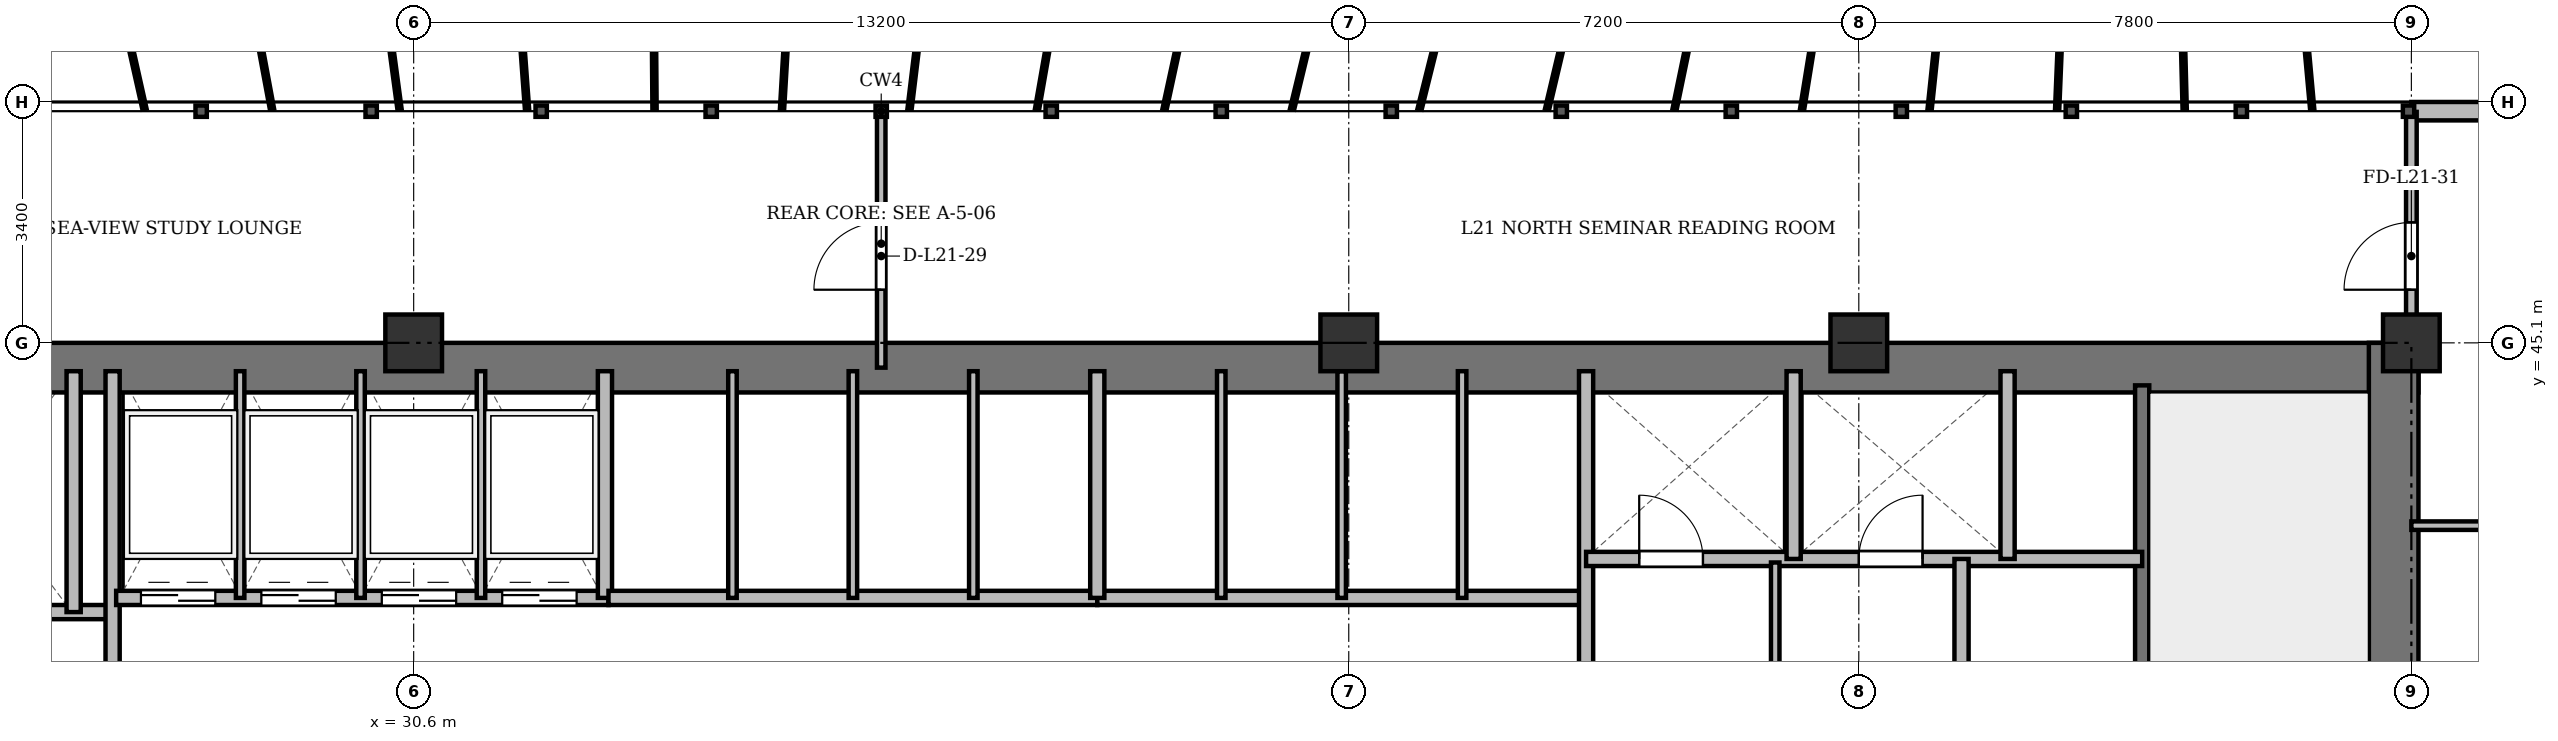
"""IFC4 building model, lengths in metres.
Left out: names, types, materials, properties, quantities, classifications, styles, units other than length and angle.
Written with IfcOpenShell. Run it as: python <this file> out.ifc"""

import sys

from ifc_helpers import new_model, si_unit, direction, frame, frame_2d, origin, origin_2d, place, context, subcontext, project, spatial, rectangle, extrude, source, transform, mapped, element, fill, save


model = new_model("IFC4")
c1 = context("Model", 3, precision=1e-05, world=origin(), true_north=direction((0.0, 1.0)))
c2 = subcontext(c1, "Body", "Model", "MODEL_VIEW")
j1 = project(units=[si_unit("LENGTHUNIT", "METRE"), si_unit("PLANEANGLEUNIT", "RADIAN")], contexts=[c1])
p1 = place(None, origin())
s1 = spatial("IfcSite", under=j1, at=p1, CompositionType="ELEMENT")
p2 = place(p1, origin())
s2 = spatial("IfcBuilding", under=s1, at=p2, CompositionType="ELEMENT")
p3 = place(p2, frame((0.0, 0.0, 85.3)))
s3 = spatial("IfcBuildingStorey", under=s2, at=p3, CompositionType="ELEMENT", Elevation=85.3)
m1 = source(origin(), c2, "Body", "SweptSolid", [
    extrude(rectangle(XDim=0.8, YDim=0.8, at=origin_2d()), origin(), (0.0, 0.0, 1.0), 3.6),
])
for number, where, z_axis, x_axis in (
    (1, (30.6, 45.1, 0.0), (0.0, 0.0, 1.0), (1.0, 0.0, 0.0)),
    (2, (43.8, 45.1, 0.0), (0.0, 0.0, 1.0), (1.0, 0.0, 0.0)),
    (3, (51.0, 45.1, 0.0), (0.0, 0.0, 1.0), (1.0, 0.0, 0.0)),
    (4, (58.8, 45.1, 0.0), (0.0, 0.0, 1.0), (1.0, 0.0, 0.0)),
):
    element("IfcColumn", number, at=place(p3, frame(where, z_axis=z_axis, x_axis=x_axis)), inside=s3, PredefinedType="COLUMN", context=c2, shape_type="MappedRepresentation", body=[
        mapped(m1, transform((0.0, 0.0, 0.0), x_axis=(1.0, 0.0, 0.0), y_axis=(0.0, 1.0, 0.0), z_axis=(0.0, 0.0, 1.0), scale=1.0)),
    ])
p4 = place(p3, frame((58.8, 48.37, 0.0), z_axis=(0.0, 0.0, 1.0), x_axis=(1.0, 0.0, 0.0)))
e5 = element("IfcWall", 5, at=p4, inside=s3, PredefinedType="SOLIDWALL", context=c2, shape_type="SweptSolid", body=[
    extrude(rectangle(XDim=8.0, YDim=0.26, at=frame_2d((4.0, 0.0))), origin(), (0.0, 0.0, 1.0), 3.34),
])
p5 = place(p4, frame((2.209, 0.0, 0.9)))
e6 = element("IfcOpeningElement", 6, at=p5, cuts=e5, PredefinedType="OPENING", context=c2, shape_type="SweptSolid", body=[
    extrude(rectangle(XDim=1.35, YDim=1.5, at=frame_2d((0.675, 0.75))), frame((0.0, 0.14, 0.0), z_axis=(0.0, -1.0, 0.0), x_axis=(1.0, 0.0, 0.0)), (0.0, 0.0, 1.0), 0.28),
])
p6 = place(p4, frame((6.033, 0.0, 0.9)))
e7 = element("IfcOpeningElement", 7, at=p6, cuts=e5, PredefinedType="OPENING", context=c2, shape_type="SweptSolid", body=[
    extrude(rectangle(XDim=1.2, YDim=1.65, at=frame_2d((0.6, 0.825))), frame((0.0, 0.14, 0.0), z_axis=(0.0, -1.0, 0.0), x_axis=(1.0, 0.0, 0.0)), (0.0, 0.0, 1.0), 0.28),
])
p7 = place(p3, frame((15.5, 44.75, 0.0), z_axis=(0.0, 0.0, 1.0), x_axis=(1.0, 0.0, 0.0)))
e8 = element("IfcWall", 8, at=p7, inside=s3, PredefinedType="SHEAR", context=c2, shape_type="SweptSolid", body=[
    extrude(rectangle(XDim=43.4, YDim=0.7, at=frame_2d((21.7, 0.0))), origin(), (0.0, 0.0, 1.0), 3.34),
])
p8 = place(p3, frame((58.55, 33.4, 0.0), z_axis=(0.0, 0.0, 1.0), x_axis=(0.0, 1.0, 0.0)))
e9 = element("IfcWall", 9, at=p8, inside=s3, PredefinedType="SHEAR", context=c2, shape_type="SweptSolid", body=[
    extrude(rectangle(XDim=11.7, YDim=0.7, at=frame_2d((5.85, 0.0))), origin(), (0.0, 0.0, 1.0), 3.34),
])
p9 = place(p3, frame((55.0, 33.4, 0.0), z_axis=(0.0, 0.0, 1.0), x_axis=(0.0, 1.0, 0.0)))
e10 = element("IfcWall", 10, at=p9, inside=s3, PredefinedType="SHEAR", context=c2, shape_type="SweptSolid", body=[
    extrude(rectangle(XDim=11.1, YDim=0.2, at=frame_2d((5.55, 0.0))), origin(), (0.0, 0.0, 1.0), 3.34),
])
p10 = place(p9, frame((0.85, 0.0, 0.0)))
e11 = element("IfcOpeningElement", 11, at=p10, cuts=e10, PredefinedType="OPENING", context=c2, shape_type="SweptSolid", body=[
    extrude(rectangle(XDim=1.1, YDim=2.15, at=frame_2d((0.55, 1.075))), frame((0.0, 0.11, 0.0), z_axis=(0.0, -1.0, 0.0), x_axis=(1.0, 0.0, 0.0)), (0.0, 0.0, 1.0), 0.22),
])
p11 = place(p3, frame((19.55, 41.3, 0.0), z_axis=(0.0, 0.0, 1.0), x_axis=(1.0, 0.0, 0.0)))
e12 = element("IfcWall", 12, at=p11, inside=s3, PredefinedType="SOLIDWALL", context=c2, shape_type="SweptSolid", body=[
    extrude(rectangle(XDim=6.75, YDim=0.2, at=frame_2d((3.375, 0.0))), origin(), (0.0, 0.0, 1.0), 3.34),
])
p12 = place(p11, frame((1.7, 0.0, 0.0)))
e13 = element("IfcOpeningElement", 13, at=p12, cuts=e12, PredefinedType="OPENING", context=c2, shape_type="SweptSolid", body=[
    extrude(rectangle(XDim=1.1, YDim=2.15, at=frame_2d((0.55, 1.075))), frame((0.0, 0.11, 0.0), z_axis=(0.0, -1.0, 0.0), x_axis=(1.0, 0.0, 0.0)), (0.0, 0.0, 1.0), 0.22),
])
p13 = place(p11, frame((4.4, 0.0, 0.0)))
e14 = element("IfcOpeningElement", 14, at=p13, cuts=e12, PredefinedType="OPENING", context=c2, shape_type="SweptSolid", body=[
    extrude(rectangle(XDim=1.1, YDim=2.15, at=frame_2d((0.55, 1.075))), frame((0.0, 0.11, 0.0), z_axis=(0.0, -1.0, 0.0), x_axis=(1.0, 0.0, 0.0)), (0.0, 0.0, 1.0), 0.22),
])
p14 = place(p3, frame((25.8, 41.3, 0.0), z_axis=(0.0, 0.0, 1.0), x_axis=(0.0, 1.0, 0.0)))
e15 = element("IfcWall", 15, at=p14, inside=s3, PredefinedType="SOLIDWALL", context=c2, shape_type="SweptSolid", body=[
    extrude(rectangle(XDim=3.4, YDim=0.2, at=frame_2d((1.7, 0.0))), origin(), (0.0, 0.0, 1.0), 3.34),
])
p15 = place(p3, frame((26.35, 33.4, 0.0), z_axis=(0.0, 0.0, 1.0), x_axis=(0.0, 1.0, 0.0)))
e16 = element("IfcWall", 16, at=p15, inside=s3, PredefinedType="SOLIDWALL", context=c2, shape_type="SweptSolid", body=[
    extrude(rectangle(XDim=11.3, YDim=0.2, at=frame_2d((5.65, 0.0))), origin(), (0.0, 0.0, 1.0), 2.752),
])
p16 = place(p3, frame((26.4, 41.5, 0.0), z_axis=(0.0, 0.0, 1.0), x_axis=(1.0, 0.0, 0.0)))
e17 = element("IfcWall", 17, at=p16, inside=s3, PredefinedType="SOLIDWALL", context=c2, shape_type="SweptSolid", body=[
    extrude(rectangle(XDim=6.95, YDim=0.2, at=frame_2d((3.475, 0.0))), origin(), (0.0, 0.0, 1.0), 3.34),
])
p17 = place(p16, frame((0.35, 0.0, 0.0)))
e18 = element("IfcOpeningElement", 18, at=p17, cuts=e17, PredefinedType="OPENING", context=c2, shape_type="SweptSolid", body=[
    extrude(rectangle(XDim=1.05, YDim=2.15, at=frame_2d((0.525, 1.075))), frame((0.0, 0.11, 0.0), z_axis=(0.0, -1.0, 0.0), x_axis=(1.0, 0.0, 0.0)), (0.0, 0.0, 1.0), 0.22),
])
p18 = place(p16, frame((2.05, 0.0, 0.0)))
e19 = element("IfcOpeningElement", 19, at=p18, cuts=e17, PredefinedType="OPENING", context=c2, shape_type="SweptSolid", body=[
    extrude(rectangle(XDim=1.05, YDim=2.15, at=frame_2d((0.525, 1.075))), frame((0.0, 0.11, 0.0), z_axis=(0.0, -1.0, 0.0), x_axis=(1.0, 0.0, 0.0)), (0.0, 0.0, 1.0), 0.22),
])
p19 = place(p16, frame((3.75, 0.0, 0.0)))
e20 = element("IfcOpeningElement", 20, at=p19, cuts=e17, PredefinedType="OPENING", context=c2, shape_type="SweptSolid", body=[
    extrude(rectangle(XDim=1.05, YDim=2.15, at=frame_2d((0.525, 1.075))), frame((0.0, 0.11, 0.0), z_axis=(0.0, -1.0, 0.0), x_axis=(1.0, 0.0, 0.0)), (0.0, 0.0, 1.0), 0.22),
])
p20 = place(p16, frame((5.45, 0.0, 0.0)))
e21 = element("IfcOpeningElement", 21, at=p20, cuts=e17, PredefinedType="OPENING", context=c2, shape_type="SweptSolid", body=[
    extrude(rectangle(XDim=1.05, YDim=2.15, at=frame_2d((0.525, 1.075))), frame((0.0, 0.11, 0.0), z_axis=(0.0, -1.0, 0.0), x_axis=(1.0, 0.0, 0.0)), (0.0, 0.0, 1.0), 0.22),
])
p21 = place(p3, frame((33.3, 41.5, 0.0), z_axis=(0.0, 0.0, 1.0), x_axis=(0.0, 1.0, 0.0)))
e22 = element("IfcWall", 22, at=p21, inside=s3, PredefinedType="SOLIDWALL", context=c2, shape_type="SweptSolid", body=[
    extrude(rectangle(XDim=3.2, YDim=0.2, at=frame_2d((1.6, 0.0))), origin(), (0.0, 0.0, 1.0), 3.34),
])
for number, where, z_axis, x_axis in (
    (23, (28.15, 41.5, 0.0), (0.0, 0.0, 1.0), (0.0, 1.0, 0.0)),
    (24, (29.85, 41.5, 0.0), (0.0, 0.0, 1.0), (0.0, 1.0, 0.0)),
    (25, (31.55, 41.5, 0.0), (0.0, 0.0, 1.0), (0.0, 1.0, 0.0)),
):
    element("IfcWall", number, at=place(p3, frame(where, z_axis=z_axis, x_axis=x_axis)), inside=s3, PredefinedType="PARTITIONING", context=c2, shape_type="SweptSolid", body=[
        extrude(rectangle(XDim=3.2, YDim=0.12, at=frame_2d((1.6, 0.0))), origin(), (0.0, 0.0, 1.0), 3.34),
    ])
p22 = place(p3, frame((33.35, 41.5, 0.0), z_axis=(0.0, 0.0, 1.0), x_axis=(1.0, 0.0, 0.0)))
e26 = element("IfcWall", 26, at=p22, inside=s3, PredefinedType="SOLIDWALL", context=c2, shape_type="SweptSolid", body=[
    extrude(rectangle(XDim=6.9, YDim=0.2, at=frame_2d((3.45, 0.0))), origin(), (0.0, 0.0, 1.0), 3.34),
])
for number, where, z_axis, x_axis in (
    (27, (35.1, 41.5, 0.0), (0.0, 0.0, 1.0), (0.0, 1.0, 0.0)),
    (28, (36.8, 41.5, 0.0), (0.0, 0.0, 1.0), (0.0, 1.0, 0.0)),
    (29, (38.5, 41.5, 0.0), (0.0, 0.0, 1.0), (0.0, 1.0, 0.0)),
):
    element("IfcWall", number, at=place(p3, frame(where, z_axis=z_axis, x_axis=x_axis)), inside=s3, PredefinedType="PARTITIONING", context=c2, shape_type="SweptSolid", body=[
        extrude(rectangle(XDim=3.2, YDim=0.12, at=frame_2d((1.6, 0.0))), origin(), (0.0, 0.0, 1.0), 3.34),
    ])
p23 = place(p3, frame((40.25, 41.5, 0.0), z_axis=(0.0, 0.0, 1.0), x_axis=(1.0, 0.0, 0.0)))
e30 = element("IfcWall", 30, at=p23, inside=s3, PredefinedType="SOLIDWALL", context=c2, shape_type="SweptSolid", body=[
    extrude(rectangle(XDim=6.9, YDim=0.2, at=frame_2d((3.45, 0.0))), origin(), (0.0, 0.0, 1.0), 2.84),
])
p24 = place(p3, frame((40.25, 41.5, 0.0), z_axis=(0.0, 0.0, 1.0), x_axis=(0.0, 1.0, 0.0)))
e31 = element("IfcWall", 31, at=p24, inside=s3, PredefinedType="SOLIDWALL", context=c2, shape_type="SweptSolid", body=[
    extrude(rectangle(XDim=3.2, YDim=0.2, at=frame_2d((1.6, 0.0))), origin(), (0.0, 0.0, 1.0), 3.34),
])
p25 = place(p3, frame((42.0, 41.5, 0.0), z_axis=(0.0, 0.0, 1.0), x_axis=(0.0, 1.0, 0.0)))
e32 = element("IfcWall", 32, at=p25, inside=s3, PredefinedType="PARTITIONING", context=c2, shape_type="SweptSolid", body=[
    extrude(rectangle(XDim=3.2, YDim=0.12, at=frame_2d((1.6, 0.0))), origin(), (0.0, 0.0, 1.0), 3.34),
])
p26 = place(p3, frame((43.7, 41.5, 0.0), z_axis=(0.0, 0.0, 1.0), x_axis=(0.0, 1.0, 0.0)))
e33 = element("IfcWall", 33, at=p26, inside=s3, PredefinedType="PARTITIONING", context=c2, shape_type="SweptSolid", body=[
    extrude(rectangle(XDim=3.2, YDim=0.12, at=frame_2d((1.6, 0.0))), origin(), (0.0, 0.0, 1.0), 2.84),
])
p27 = place(p3, frame((45.4, 41.5, 0.0), z_axis=(0.0, 0.0, 1.0), x_axis=(0.0, 1.0, 0.0)))
e34 = element("IfcWall", 34, at=p27, inside=s3, PredefinedType="PARTITIONING", context=c2, shape_type="SweptSolid", body=[
    extrude(rectangle(XDim=3.2, YDim=0.12, at=frame_2d((1.6, 0.0))), origin(), (0.0, 0.0, 1.0), 3.34),
])
p28 = place(p3, frame((47.15, 33.4, 0.0), z_axis=(0.0, 0.0, 1.0), x_axis=(0.0, 1.0, 0.0)))
e35 = element("IfcWall", 35, at=p28, inside=s3, PredefinedType="SOLIDWALL", context=c2, shape_type="SweptSolid", body=[
    extrude(rectangle(XDim=11.3, YDim=0.2, at=frame_2d((5.65, 0.0))), origin(), (0.0, 0.0, 1.0), 2.752),
])
p29 = place(p3, frame((47.15, 42.05, 0.0), z_axis=(0.0, 0.0, 1.0), x_axis=(1.0, 0.0, 0.0)))
e36 = element("IfcWall", 36, at=p29, inside=s3, PredefinedType="SOLIDWALL", context=c2, shape_type="SweptSolid", body=[
    extrude(rectangle(XDim=7.85, YDim=0.2, at=frame_2d((3.925, 0.0))), origin(), (0.0, 0.0, 1.0), 2.84),
])
p30 = place(p29, frame((0.75, 0.0, 0.0)))
e37 = element("IfcOpeningElement", 37, at=p30, cuts=e36, PredefinedType="OPENING", context=c2, shape_type="SweptSolid", body=[
    extrude(rectangle(XDim=0.9, YDim=2.1, at=frame_2d((0.45, 1.05))), frame((0.0, 0.11, 0.0), z_axis=(0.0, -1.0, 0.0), x_axis=(1.0, 0.0, 0.0)), (0.0, 0.0, 1.0), 0.22),
])
p31 = place(p29, frame((3.85, 0.0, 0.0)))
e38 = element("IfcOpeningElement", 38, at=p31, cuts=e36, PredefinedType="OPENING", context=c2, shape_type="SweptSolid", body=[
    extrude(rectangle(XDim=0.9, YDim=2.1, at=frame_2d((0.45, 1.05))), frame((0.0, 0.11, 0.0), z_axis=(0.0, -1.0, 0.0), x_axis=(1.0, 0.0, 0.0)), (0.0, 0.0, 1.0), 0.22),
])
for number, where, z_axis, x_axis in (
    (39, (50.08, 42.05, 0.0), (0.0, 0.0, 1.0), (0.0, 1.0, 0.0)),
    (40, (53.1, 42.05, 0.0), (0.0, 0.0, 1.0), (0.0, 1.0, 0.0)),
):
    element("IfcWall", number, at=place(p3, frame(where, z_axis=z_axis, x_axis=x_axis)), inside=s3, PredefinedType="SOLIDWALL", context=c2, shape_type="SweptSolid", body=[
        extrude(rectangle(XDim=2.65, YDim=0.2, at=frame_2d((1.325, 0.0))), origin(), (0.0, 0.0, 1.0), 3.34),
    ])
p32 = place(p3, frame((52.45, 33.4, 0.0), z_axis=(0.0, 0.0, 1.0), x_axis=(0.0, 1.0, 0.0)))
e41 = element("IfcWall", 41, at=p32, inside=s3, PredefinedType="PARTITIONING", context=c2, shape_type="SweptSolid", body=[
    extrude(rectangle(XDim=8.65, YDim=0.2, at=frame_2d((4.325, 0.0))), origin(), (0.0, 0.0, 1.0), 2.752),
])
p33 = place(p32, frame((6.2, 0.0, 0.0)))
e42 = element("IfcOpeningElement", 42, at=p33, cuts=e41, PredefinedType="OPENING", context=c2, shape_type="SweptSolid", body=[
    extrude(rectangle(XDim=0.95, YDim=2.15, at=frame_2d((0.475, 1.075))), frame((0.0, 0.11, 0.0), z_axis=(0.0, -1.0, 0.0), x_axis=(1.0, 0.0, 0.0)), (0.0, 0.0, 1.0), 0.22),
])
p34 = place(p3, frame((49.82, 36.18, 0.0), z_axis=(0.0, 0.0, 1.0), x_axis=(0.0, 1.0, 0.0)))
e43 = element("IfcWall", 43, at=p34, inside=s3, PredefinedType="PARTITIONING", context=c2, shape_type="SweptSolid", body=[
    extrude(rectangle(XDim=5.82, YDim=0.12, at=frame_2d((2.91, 0.0))), origin(), (0.0, 0.0, 1.0), 3.34),
])
p35 = place(p3, frame((58.8, 42.52, 0.0), z_axis=(0.0, 0.0, 1.0), x_axis=(1.0, 0.0, 0.0)))
e44 = element("IfcWall", 44, at=p35, inside=s3, PredefinedType="PARTITIONING", context=c2, shape_type="SweptSolid", body=[
    extrude(rectangle(XDim=5.425, YDim=0.12, at=frame_2d((2.712, 0.0))), origin(), (0.0, 0.0, 1.0), 2.84),
])
p36 = place(p35, frame((2.423, 0.0, 0.0)))
e45 = element("IfcOpeningElement", 45, at=p36, cuts=e44, PredefinedType="OPENING", context=c2, shape_type="SweptSolid", body=[
    extrude(rectangle(XDim=0.95, YDim=2.15, at=frame_2d((0.475, 1.075))), frame((0.0, 0.07, 0.0), z_axis=(0.0, -1.0, 0.0), x_axis=(1.0, 0.0, 0.0)), (0.0, 0.0, 1.0), 0.14),
])
p37 = place(p3, frame((37.2, 44.75, 0.0), z_axis=(0.0, 0.0, 1.0), x_axis=(0.0, 1.0, 0.0)))
e46 = element("IfcWall", 46, at=p37, inside=s3, PredefinedType="PARTITIONING", context=c2, shape_type="SweptSolid", body=[
    extrude(rectangle(XDim=3.61, YDim=0.12, at=frame_2d((1.805, 0.0))), origin(), (0.0, 0.0, 1.0), 2.752),
])
p38 = place(p37, frame((1.1, 0.0, 0.0)))
e47 = element("IfcOpeningElement", 47, at=p38, cuts=e46, PredefinedType="OPENING", context=c2, shape_type="SweptSolid", body=[
    extrude(rectangle(XDim=0.95, YDim=2.15, at=frame_2d((0.475, 1.075))), frame((0.0, 0.07, 0.0), z_axis=(0.0, -1.0, 0.0), x_axis=(1.0, 0.0, 0.0)), (0.0, 0.0, 1.0), 0.14),
])
p39 = place(p3, frame((58.8, 44.75, 0.0), z_axis=(0.0, 0.0, 1.0), x_axis=(0.0, 1.0, 0.0)))
e48 = element("IfcWall", 48, at=p39, inside=s3, PredefinedType="PARTITIONING", context=c2, shape_type="SweptSolid", body=[
    extrude(rectangle(XDim=3.61, YDim=0.15, at=frame_2d((1.805, 0.0))), origin(), (0.0, 0.0, 1.0), 2.84),
])
p40 = place(p39, frame((1.1, 0.0, 0.0)))
e49 = element("IfcOpeningElement", 49, at=p40, cuts=e48, PredefinedType="OPENING", context=c2, shape_type="SweptSolid", body=[
    extrude(rectangle(XDim=0.95, YDim=2.15, at=frame_2d((0.475, 1.075))), frame((0.0, 0.085, 0.0), z_axis=(0.0, -1.0, 0.0), x_axis=(1.0, 0.0, 0.0)), (0.0, 0.0, 1.0), 0.17),
])
m2 = source(origin(), c2, "Body", "SweptSolid", [
    extrude(rectangle(XDim=1.05, YDim=2.15, at=frame_2d((0.525, 1.075))), frame((0.0, 0.025, 0.0), z_axis=(0.0, -1.0, 0.0), x_axis=(1.0, 0.0, 0.0)), (0.0, 0.0, 1.0), 0.05),
])
p41 = place(p17, origin())
e50 = element("IfcDoor", 50, at=p41, inside=s3, OperationType="DOUBLE_DOOR_SLIDING", PredefinedType="DOOR", context=c2, shape_type="MappedRepresentation", body=[
    mapped(m2, transform((0.0, 0.0, 0.0), x_axis=(1.0, 0.0, 0.0), y_axis=(0.0, 1.0, 0.0), z_axis=(0.0, 0.0, 1.0), scale=1.0)),
])
fill(e18, e50)
p42 = place(p18, origin())
e51 = element("IfcDoor", 51, at=p42, inside=s3, OperationType="DOUBLE_DOOR_SLIDING", PredefinedType="DOOR", context=c2, shape_type="MappedRepresentation", body=[
    mapped(m2, transform((0.0, 0.0, 0.0), x_axis=(1.0, 0.0, 0.0), y_axis=(0.0, 1.0, 0.0), z_axis=(0.0, 0.0, 1.0), scale=1.0)),
])
fill(e19, e51)
p43 = place(p19, origin())
e52 = element("IfcDoor", 52, at=p43, inside=s3, OperationType="DOUBLE_DOOR_SLIDING", PredefinedType="DOOR", context=c2, shape_type="MappedRepresentation", body=[
    mapped(m2, transform((0.0, 0.0, 0.0), x_axis=(1.0, 0.0, 0.0), y_axis=(0.0, 1.0, 0.0), z_axis=(0.0, 0.0, 1.0), scale=1.0)),
])
fill(e20, e52)
p44 = place(p20, origin())
e53 = element("IfcDoor", 53, at=p44, inside=s3, OperationType="DOUBLE_DOOR_SLIDING", PredefinedType="DOOR", context=c2, shape_type="MappedRepresentation", body=[
    mapped(m2, transform((0.0, 0.0, 0.0), x_axis=(1.0, 0.0, 0.0), y_axis=(0.0, 1.0, 0.0), z_axis=(0.0, 0.0, 1.0), scale=1.0)),
])
fill(e21, e53)
m3 = source(origin(), c2, "Body", "SweptSolid", [
    extrude(rectangle(XDim=0.9, YDim=2.1, at=frame_2d((0.45, 1.05))), frame((0.0, 0.025, 0.0), z_axis=(0.0, -1.0, 0.0), x_axis=(1.0, 0.0, 0.0)), (0.0, 0.0, 1.0), 0.05),
])
p45 = place(p30, origin())
e54 = element("IfcDoor", 54, at=p45, inside=s3, OperationType="SINGLE_SWING_LEFT", PredefinedType="DOOR", context=c2, shape_type="MappedRepresentation", body=[
    mapped(m3, transform((0.0, 0.0, 0.0), x_axis=(1.0, 0.0, 0.0), y_axis=(0.0, 1.0, 0.0), z_axis=(0.0, 0.0, 1.0), scale=1.0)),
])
fill(e37, e54)
p46 = place(p31, origin())
e55 = element("IfcDoor", 55, at=p46, inside=s3, OperationType="SINGLE_SWING_RIGHT", PredefinedType="DOOR", context=c2, shape_type="MappedRepresentation", body=[
    mapped(m3, transform((0.0, 0.0, 0.0), x_axis=(1.0, 0.0, 0.0), y_axis=(0.0, 1.0, 0.0), z_axis=(0.0, 0.0, 1.0), scale=1.0)),
])
fill(e38, e55)
m4 = source(origin(), c2, "Body", "SweptSolid", [
    extrude(rectangle(XDim=0.95, YDim=2.15, at=frame_2d((0.475, 1.075))), frame((0.0, 0.025, 0.0), z_axis=(0.0, -1.0, 0.0), x_axis=(1.0, 0.0, 0.0)), (0.0, 0.0, 1.0), 0.05),
])
p47 = place(p38, origin())
e56 = element("IfcDoor", 56, at=p47, inside=s3, OperationType="SINGLE_SWING_LEFT", PredefinedType="DOOR", context=c2, shape_type="MappedRepresentation", body=[
    mapped(m4, transform((0.0, 0.0, 0.0), x_axis=(1.0, 0.0, 0.0), y_axis=(0.0, 1.0, 0.0), z_axis=(0.0, 0.0, 1.0), scale=1.0)),
])
fill(e47, e56)
p48 = place(p40, origin())
e57 = element("IfcDoor", 57, at=p48, inside=s3, OperationType="SINGLE_SWING_LEFT", PredefinedType="DOOR", context=c2, shape_type="MappedRepresentation", body=[
    mapped(m4, transform((0.0, 0.0, 0.0), x_axis=(1.0, 0.0, 0.0), y_axis=(0.0, 1.0, 0.0), z_axis=(0.0, 0.0, 1.0), scale=1.0)),
])
fill(e49, e57)
save(model, sys.argv[1])
